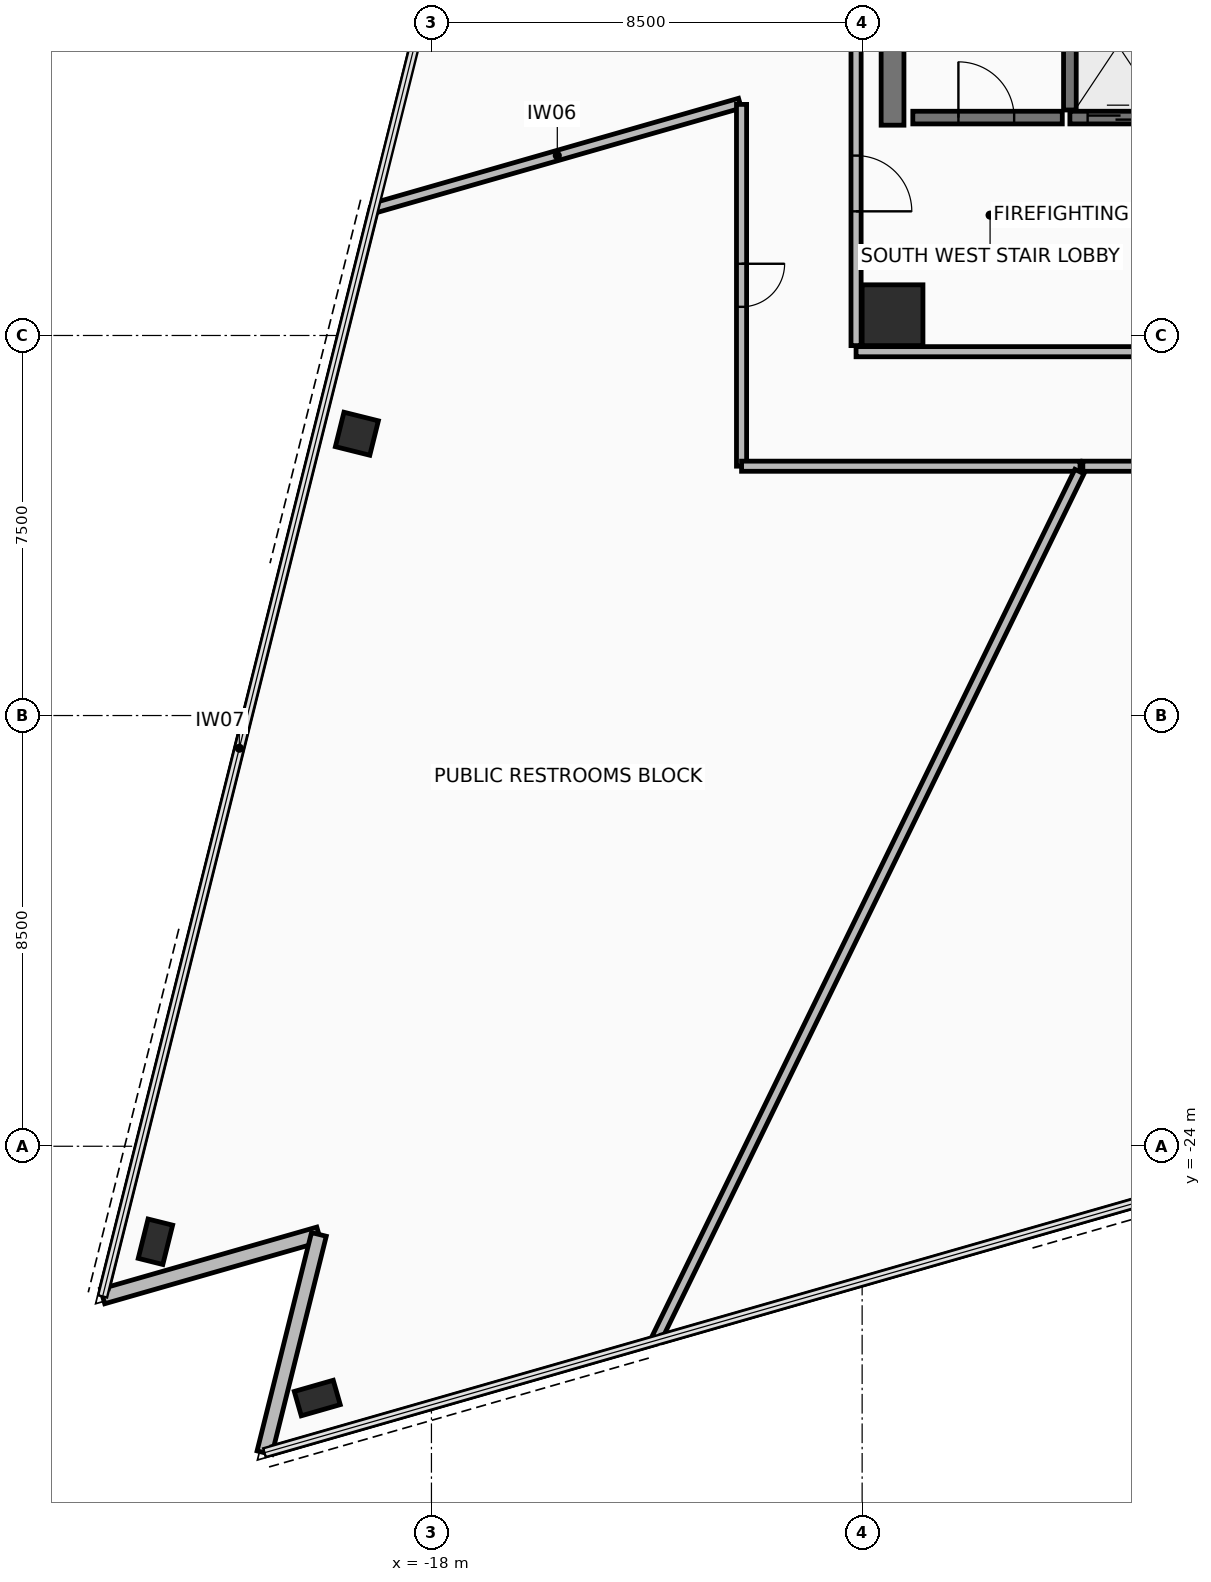
"""IFC4 building model, lengths in metres.
Left out: names, types, materials, properties, quantities, classifications, styles, units other than length and angle.
Written with IfcOpenShell. Run it as: python <this file> out.ifc"""

import sys

from ifc_helpers import new_model, si_unit, direction, frame, frame_2d, origin, origin_2d, place, context, subcontext, project, spatial, rectangle, hollow_rectangle, extrude, element, fill, save


model = new_model("IFC4")
c1 = context("Model", 3, precision=1e-05, world=origin(), true_north=direction((0.0, 1.0)))
c2 = subcontext(c1, "Body", "Model", "MODEL_VIEW")
j1 = project(units=[si_unit("LENGTHUNIT", "METRE"), si_unit("PLANEANGLEUNIT", "RADIAN")], contexts=[c1])
p1 = place(None, origin())
s1 = spatial("IfcSite", under=j1, at=p1, CompositionType="ELEMENT")
p2 = place(p1, origin())
s2 = spatial("IfcBuilding", under=s1, at=p2, CompositionType="ELEMENT")
p3 = place(p2, frame((0.0, 0.0, 93.3)))
s3 = spatial("IfcBuildingStorey", under=s2, at=p3, CompositionType="ELEMENT", Elevation=93.3)
p4 = place(p3, frame((-8.9, -7.6, 0.0), z_axis=(0.0, 0.0, 1.0), x_axis=(1.0, 0.0, 0.0)))
e1 = element("IfcColumn", 1, at=p4, inside=s3, PredefinedType="COLUMN", context=c2, shape_type="SweptSolid", body=[
    extrude(rectangle(XDim=1.2, YDim=1.2, at=origin_2d()), origin(), (0.0, 0.0, 1.0), 3.6),
])
p5 = place(p3, frame((-19.472, -9.939, 0.0), z_axis=(0.0, 0.0, 1.0), x_axis=(0.2419218956, 0.970295726276, 0.0)))
e2 = element("IfcColumn", 2, at=p5, inside=s3, PredefinedType="COLUMN", context=c2, shape_type="SweptSolid", body=[
    extrude(hollow_rectangle(XDim=0.7, YDim=0.7, WallThickness=0.04, at=origin_2d()), origin(), (0.0, 0.0, 1.0), 3.6),
])
for number, where, z_axis, x_axis in (
    (3, (-23.447, -25.885, 0.0), (0.0, 0.0, 1.0), (0.242, 0.97, 0.0)),
    (4, (-20.253, -28.969, 0.0), (0.0, 0.0, 1.0), (0.961, 0.276, 0.0)),
):
    element("IfcColumn", number, at=place(p3, frame(where, z_axis=z_axis, x_axis=x_axis)), inside=s3, PredefinedType="COLUMN", context=c2, shape_type="SweptSolid", body=[
        extrude(hollow_rectangle(XDim=0.5, YDim=0.8, WallThickness=0.04, at=origin_2d()), origin(), (0.0, 0.0, 1.0), 3.6),
    ])
p6 = place(p3, frame((-24.489, -26.964, 0.0), z_axis=(0.0, 0.0, 1.0), x_axis=(0.961259988927, 0.275643308803, 0.0)))
e5 = element("IfcWall", 5, at=p6, inside=s3, PredefinedType="STANDARD", context=c2, shape_type="SweptSolid", body=[
    extrude(rectangle(XDim=4.44, YDim=0.3, at=frame_2d((2.22, 0.0))), origin(), (0.0, 0.0, 1.0), 2.605),
])
p7 = place(p3, frame((-20.221, -25.74, 0.0), z_axis=(0.0, 0.0, 1.0), x_axis=(-0.241940431812, -0.970291104491, 0.0)))
e6 = element("IfcWall", 6, at=p7, inside=s3, PredefinedType="STANDARD", context=c2, shape_type="SweptSolid", body=[
    extrude(rectangle(XDim=4.44, YDim=0.3, at=frame_2d((2.22, 0.0))), origin(), (0.0, 0.0, 1.0), 2.605),
])
p8 = place(p3, frame((-8.9, -3.85, 0.0), z_axis=(0.0, 0.0, 1.0), x_axis=(0.0, 1.0, 0.0)))
e7 = element("IfcWall", 7, at=p8, inside=s3, PredefinedType="SHEAR", context=c2, shape_type="SweptSolid", body=[
    extrude(rectangle(XDim=10.7, YDim=0.45, at=frame_2d((5.35, 0.0))), origin(), (0.0, 0.0, 1.0), 3.41),
])
p9 = place(p3, frame((-9.62, -8.32, 0.0), z_axis=(0.0, 0.0, 1.0), x_axis=(1.0, 0.0, 0.0)))
e8 = element("IfcWall", 8, at=p9, inside=s3, PredefinedType="PARTITIONING", context=c2, shape_type="SweptSolid", body=[
    extrude(rectangle(XDim=19.24, YDim=0.2, at=frame_2d((9.62, 0.0))), origin(), (0.0, 0.0, 1.0), 2.805),
])
p10 = place(p9, frame((8.57, 0.0, 0.0)))
e9 = element("IfcOpeningElement", 9, at=p10, cuts=e8, PredefinedType="OPENING", context=c2, shape_type="SweptSolid", body=[
    extrude(rectangle(XDim=0.9, YDim=2.1, at=frame_2d((0.45, 1.05))), frame((0.0, 0.11, 0.0), z_axis=(0.0, -1.0, 0.0), x_axis=(1.0, 0.0, 0.0)), (0.0, 0.0, 1.0), 0.22),
])
p11 = place(p9, frame((15.02, 0.0, 0.0)))
e10 = element("IfcOpeningElement", 10, at=p11, cuts=e8, PredefinedType="OPENING", context=c2, shape_type="SweptSolid", body=[
    extrude(rectangle(XDim=0.9, YDim=2.1, at=frame_2d((0.45, 1.05))), frame((0.0, 0.11, 0.0), z_axis=(0.0, -1.0, 0.0), x_axis=(1.0, 0.0, 0.0)), (0.0, 0.0, 1.0), 0.22),
])
p12 = place(p3, frame((-9.62, 8.2, 0.0), z_axis=(0.0, 0.0, 1.0), x_axis=(0.0, -1.0, 0.0)))
e11 = element("IfcWall", 11, at=p12, inside=s3, PredefinedType="PARTITIONING", context=c2, shape_type="SweptSolid", body=[
    extrude(rectangle(XDim=16.4, YDim=0.2, at=frame_2d((8.2, 0.0))), origin(), (0.0, 0.0, 1.0), 2.805),
])
p13 = place(p12, frame((12.65, 0.0, 0.0)))
e12 = element("IfcOpeningElement", 12, at=p13, cuts=e11, PredefinedType="OPENING", context=c2, shape_type="SweptSolid", body=[
    extrude(rectangle(XDim=1.1, YDim=2.15, at=frame_2d((0.55, 1.075))), frame((0.0, 0.11, 0.0), z_axis=(0.0, -1.0, 0.0), x_axis=(1.0, 0.0, 0.0)), (0.0, 0.0, 1.0), 0.22),
])
p14 = place(p3, frame((-5.4, -3.55, 0.0), z_axis=(0.0, 0.0, 1.0), x_axis=(0.0, 1.0, 0.0)))
e13 = element("IfcWall", 13, at=p14, inside=s3, PredefinedType="SHEAR", context=c2, shape_type="SweptSolid", body=[
    extrude(rectangle(XDim=7.3, YDim=0.25, at=frame_2d((3.65, 0.0))), origin(), (0.0, 0.0, 1.0), 3.41),
])
p15 = place(p3, frame((-8.5, -3.7, 0.0), z_axis=(0.0, 0.0, 1.0), x_axis=(1.0, 0.0, 0.0)))
e14 = element("IfcWall", 14, at=p15, inside=s3, PredefinedType="SHEAR", context=c2, shape_type="SweptSolid", body=[
    extrude(rectangle(XDim=2.95, YDim=0.25, at=frame_2d((1.475, 0.0))), origin(), (0.0, 0.0, 1.0), 3.41),
])
p16 = place(p15, frame((0.9, 0.0, 0.0)))
e15 = element("IfcOpeningElement", 15, at=p16, cuts=e14, PredefinedType="OPENING", context=c2, shape_type="SweptSolid", body=[
    extrude(rectangle(XDim=1.1, YDim=2.15, at=frame_2d((0.55, 1.075))), frame((0.0, 0.135, 0.0), z_axis=(0.0, -1.0, 0.0), x_axis=(1.0, 0.0, 0.0)), (0.0, 0.0, 1.0), 0.27),
])
p17 = place(p3, frame((-5.4, -3.7, 0.0), z_axis=(0.0, 0.0, 1.0), x_axis=(1.0, 0.0, 0.0)))
e16 = element("IfcWall", 16, at=p17, inside=s3, PredefinedType="SHEAR", context=c2, shape_type="SweptSolid", body=[
    extrude(rectangle(XDim=1.9, YDim=0.25, at=frame_2d((0.95, 0.0))), origin(), (0.0, 0.0, 1.0), 3.41),
])
p18 = place(p17, frame((0.35, 0.0, 0.0)))
e17 = element("IfcOpeningElement", 17, at=p18, cuts=e16, PredefinedType="OPENING", context=c2, shape_type="SweptSolid", body=[
    extrude(rectangle(XDim=1.2, YDim=2.2, at=frame_2d((0.6, 1.1))), frame((0.0, 0.135, 0.0), z_axis=(0.0, -1.0, 0.0), x_axis=(1.0, 0.0, 0.0)), (0.0, 0.0, 1.0), 0.27),
])
p19 = place(p3, frame((-24.446, -26.79, 0.0), z_axis=(0.0, 0.0, 1.0), x_axis=(0.241928161831, 0.970294163908, 0.0)))
e18 = element("IfcWall", 18, at=p19, inside=s3, PredefinedType="PARTITIONING", context=c2, shape_type="SweptSolid", body=[
    extrude(rectangle(XDim=21.941, YDim=0.15, at=frame_2d((10.97, 0.0))), origin(), (0.0, 0.0, 1.0), 3.41),
])
p20 = place(p3, frame((-19.121, -5.483, 0.0), z_axis=(0.0, 0.0, 1.0), x_axis=(0.961259375601, 0.275645447665, 0.0)))
e19 = element("IfcWall", 19, at=p20, inside=s3, PredefinedType="PARTITIONING", context=c2, shape_type="SweptSolid", body=[
    extrude(rectangle(XDim=7.499, YDim=0.2, at=frame_2d((3.75, 0.0))), origin(), (0.0, 0.0, 1.0), 2.605),
])
p21 = place(p3, frame((-11.88, -3.44, 0.0), z_axis=(0.0, 0.0, 1.0), x_axis=(0.0, -1.0, 0.0)))
e20 = element("IfcWall", 20, at=p21, inside=s3, PredefinedType="PARTITIONING", context=c2, shape_type="SweptSolid", body=[
    extrude(rectangle(XDim=7.14, YDim=0.2, at=frame_2d((3.57, 0.0))), origin(), (0.0, 0.0, 1.0), 2.805),
])
p22 = place(p21, frame((3.145, 0.0, 0.0)))
e21 = element("IfcOpeningElement", 21, at=p22, cuts=e20, PredefinedType="OPENING", context=c2, shape_type="SweptSolid", body=[
    extrude(rectangle(XDim=0.85, YDim=2.1, at=frame_2d((0.425, 1.05))), frame((0.0, 0.11, 0.0), z_axis=(0.0, -1.0, 0.0), x_axis=(1.0, 0.0, 0.0)), (0.0, 0.0, 1.0), 0.22),
])
p23 = place(p3, frame((-11.879, -10.58, 0.0), z_axis=(0.0, 0.0, 1.0), x_axis=(1.0, 0.0, 0.0)))
e22 = element("IfcWall", 22, at=p23, inside=s3, PredefinedType="PARTITIONING", context=c2, shape_type="SweptSolid", body=[
    extrude(rectangle(XDim=6.679, YDim=0.2, at=frame_2d((3.34, 0.0))), origin(), (0.0, 0.0, 1.0), 2.805),
])
p24 = place(p3, frame((-5.211, -10.685, 0.0), z_axis=(0.0, 0.0, 1.0), x_axis=(-0.438373182397, -0.898793053464, 0.0)))
e23 = element("IfcWall", 23, at=p24, inside=s3, PredefinedType="PARTITIONING", context=c2, shape_type="SweptSolid", body=[
    extrude(rectangle(XDim=19.069, YDim=0.2, at=frame_2d((9.535, 0.0))), origin(), (0.0, 0.0, 1.0), 2.605),
])
p25 = place(p3, frame((-13.586, -27.837, 0.0), z_axis=(0.0, 0.0, 1.0), x_axis=(-0.961259140901, -0.275646266135, 0.0)))
e24 = element("IfcWall", 24, at=p25, inside=s3, PredefinedType="PARTITIONING", context=c2, shape_type="SweptSolid", body=[
    extrude(rectangle(XDim=7.841, YDim=0.15, at=frame_2d((3.92, 0.0))), origin(), (0.0, 0.0, 1.0), 3.41),
])
p26 = place(p3, frame((-5.145, -10.58, 0.0), z_axis=(0.0, 0.0, 1.0), x_axis=(1.0, 0.0, 0.0)))
e25 = element("IfcWall", 25, at=p26, inside=s3, PredefinedType="PARTITIONING", context=c2, shape_type="SweptSolid", body=[
    extrude(rectangle(XDim=9.189, YDim=0.2, at=frame_2d((4.594, 0.0))), origin(), (0.0, 0.0, 1.0), 2.805),
])
p27 = place(p26, frame((4.169, 0.0, 0.0)))
e26 = element("IfcOpeningElement", 26, at=p27, cuts=e25, PredefinedType="OPENING", context=c2, shape_type="SweptSolid", body=[
    extrude(rectangle(XDim=0.85, YDim=2.1, at=frame_2d((0.425, 1.05))), frame((0.0, 0.11, 0.0), z_axis=(0.0, -1.0, 0.0), x_axis=(1.0, 0.0, 0.0)), (0.0, 0.0, 1.0), 0.22),
])
p28 = place(p3, frame((8.253, -21.575, 0.0), z_axis=(0.0, 0.0, 1.0), x_axis=(-0.961261412197, -0.275638345338, 0.0)))
e27 = element("IfcWall", 27, at=p28, inside=s3, PredefinedType="PARTITIONING", context=c2, shape_type="SweptSolid", body=[
    extrude(rectangle(XDim=22.567, YDim=0.15, at=frame_2d((11.283, 0.0))), origin(), (0.0, 0.0, 1.0), 3.41),
])
p29 = place(p13, frame((1.1, 0.0, 0.0), z_axis=(0.0, 0.0, 1.0), x_axis=(-1.0, 0.0, 0.0)))
e28 = element("IfcDoor", 28, at=p29, inside=s3, OperationType="SINGLE_SWING_LEFT", PredefinedType="DOOR", context=c2, shape_type="SweptSolid", body=[
    extrude(rectangle(XDim=1.1, YDim=2.15, at=frame_2d((0.55, 1.075))), frame((0.0, 0.025, 0.0), z_axis=(0.0, -1.0, 0.0), x_axis=(1.0, 0.0, 0.0)), (0.0, 0.0, 1.0), 0.05),
])
fill(e12, e28)
p30 = place(p16, origin())
e29 = element("IfcDoor", 29, at=p30, inside=s3, OperationType="SINGLE_SWING_LEFT", PredefinedType="DOOR", context=c2, shape_type="SweptSolid", body=[
    extrude(rectangle(XDim=1.1, YDim=2.15, at=frame_2d((0.55, 1.075))), frame((0.0, 0.025, 0.0), z_axis=(0.0, -1.0, 0.0), x_axis=(1.0, 0.0, 0.0)), (0.0, 0.0, 1.0), 0.05),
])
fill(e15, e29)
p31 = place(p18, origin())
e30 = element("IfcDoor", 30, at=p31, inside=s3, OperationType="SLIDING_TO_RIGHT", PredefinedType="DOOR", context=c2, shape_type="SweptSolid", body=[
    extrude(rectangle(XDim=1.2, YDim=2.2, at=frame_2d((0.6, 1.1))), frame((0.0, 0.025, 0.0), z_axis=(0.0, -1.0, 0.0), x_axis=(1.0, 0.0, 0.0)), (0.0, 0.0, 1.0), 0.05),
])
fill(e17, e30)
p32 = place(p22, origin())
e31 = element("IfcDoor", 31, at=p32, inside=s3, OperationType="SINGLE_SWING_RIGHT", PredefinedType="DOOR", context=c2, shape_type="SweptSolid", body=[
    extrude(rectangle(XDim=0.85, YDim=2.1, at=frame_2d((0.425, 1.05))), frame((0.0, 0.025, 0.0), z_axis=(0.0, -1.0, 0.0), x_axis=(1.0, 0.0, 0.0)), (0.0, 0.0, 1.0), 0.05),
])
fill(e21, e31)
save(model, sys.argv[1])
